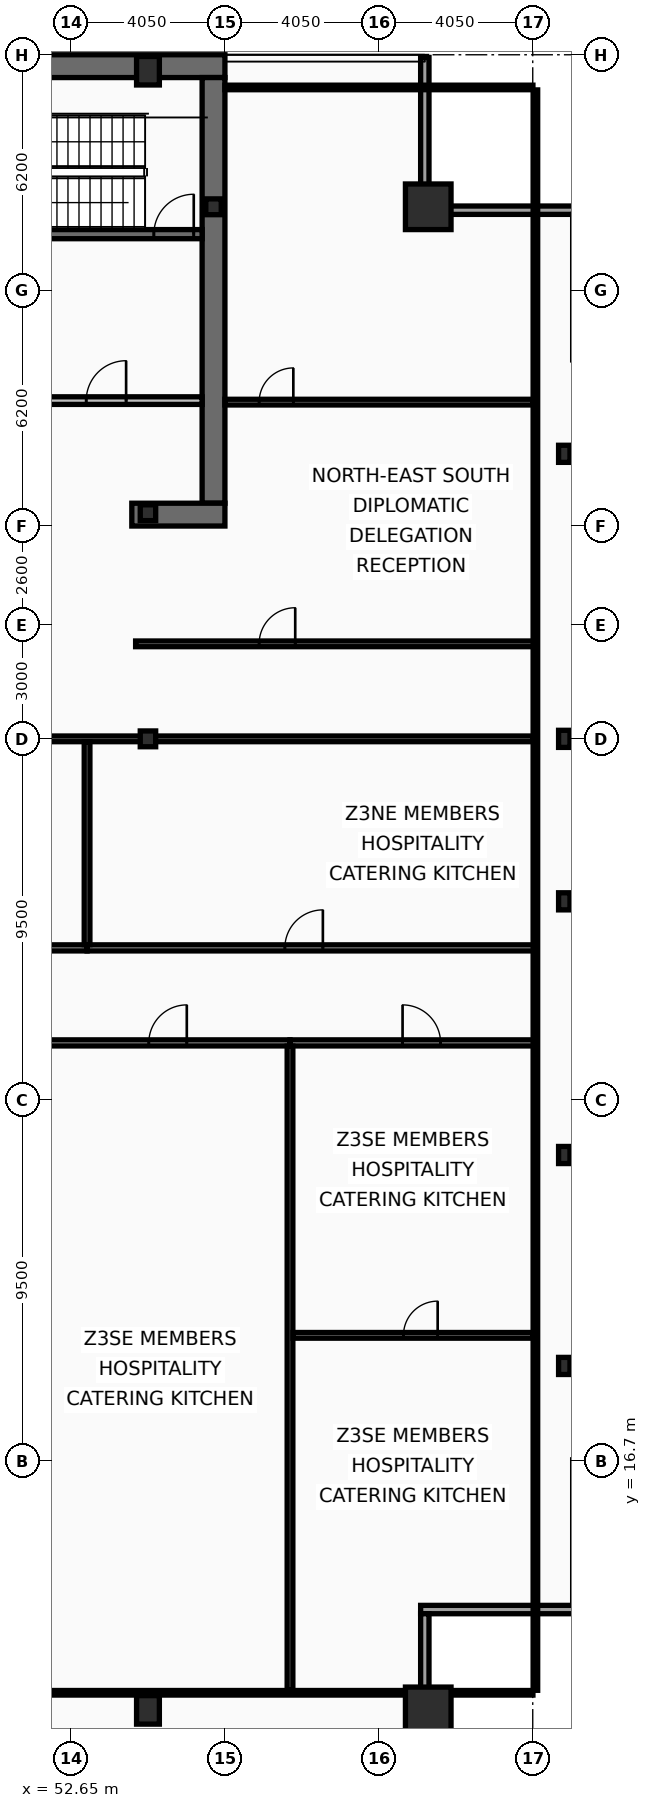
"""IFC4 building model, lengths in metres.
Left out: names, types, materials, properties, quantities, classifications, styles, units other than length and angle.
Written with IfcOpenShell. Run it as: python <this file> out.ifc"""

import sys

from ifc_helpers import new_model, si_unit, direction, frame, frame_2d, origin, origin_2d, place, context, subcontext, project, spatial, rectangle, hollow_rectangle, i_section, extrude, element, fill, save


model = new_model("IFC4")
c1 = context("Model", 3, precision=1e-05, world=origin(), true_north=direction((0.0, 1.0)))
c2 = subcontext(c1, "Body", "Model", "MODEL_VIEW")
j1 = project(units=[si_unit("LENGTHUNIT", "METRE"), si_unit("PLANEANGLEUNIT", "RADIAN")], contexts=[c1])
p1 = place(None, origin())
s1 = spatial("IfcSite", under=j1, at=p1, CompositionType="ELEMENT")
p2 = place(p1, origin())
s2 = spatial("IfcBuilding", under=s1, at=p2, CompositionType="ELEMENT")
p3 = place(p2, frame((0.0, 0.0, 210.2)))
s3 = spatial("IfcBuildingStorey", under=s2, at=p3, CompositionType="ELEMENT", Elevation=210.2)
p4 = place(p3, frame((16.2, 53.4, 0.0), z_axis=(0.0, 0.0, 1.0), x_axis=(1.0, 0.0, 0.0)))
e1 = element("IfcWall", 1, at=p4, inside=s3, PredefinedType="SHEAR", context=c2, shape_type="SweptSolid", body=[
    extrude(rectangle(XDim=40.5, YDim=0.6, at=frame_2d((20.25, 0.0))), origin(), (0.0, 0.0, 1.0), 3.44),
])
p5 = place(p3, frame((56.4, 53.1, 0.0), z_axis=(0.0, 0.0, 1.0), x_axis=(0.0, -1.0, 0.0)))
e2 = element("IfcWall", 2, at=p5, inside=s3, PredefinedType="SHEAR", context=c2, shape_type="SweptSolid", body=[
    extrude(rectangle(XDim=11.2, YDim=0.6, at=frame_2d((5.6, 0.0))), origin(), (0.0, 0.0, 1.0), 3.44),
])
p6 = place(p3, frame((56.7, 41.6, 0.0), z_axis=(0.0, 0.0, 1.0), x_axis=(-1.0, 0.0, 0.0)))
e3 = element("IfcWall", 3, at=p6, inside=s3, PredefinedType="SHEAR", context=c2, shape_type="SweptSolid", body=[
    extrude(rectangle(XDim=2.45, YDim=0.6, at=frame_2d((1.225, 0.0))), origin(), (0.0, 0.0, 1.0), 3.44),
])
p7 = place(p3, frame((48.63, 48.98, 0.0), z_axis=(0.0, 0.0, 1.0), x_axis=(1.0, 0.0, 0.0)))
e4 = element("IfcWall", 4, at=p7, inside=s3, PredefinedType="SHEAR", context=c2, shape_type="SweptSolid", body=[
    extrude(rectangle(XDim=7.47, YDim=0.24, at=frame_2d((3.735, 0.0))), origin(), (0.0, 0.0, 1.0), 3.44),
])
p8 = place(p7, frame((6.2, 0.0, 0.0)))
e5 = element("IfcOpeningElement", 5, at=p8, cuts=e4, PredefinedType="OPENING", context=c2, shape_type="SweptSolid", body=[
    extrude(rectangle(XDim=1.05, YDim=2.15, at=frame_2d((0.525, 1.075))), frame((0.0, 0.13, 0.0), z_axis=(0.0, -1.0, 0.0), x_axis=(1.0, 0.0, 0.0)), (0.0, 0.0, 1.0), 0.26),
])
for number, where, z_axis, x_axis in (
    (6, (62.05, 10.15, 0.0), (0.0, 0.0, 1.0), (1.0, 0.0, 0.0)),
    (7, (62.05, 49.7, 0.0), (0.0, 0.0, 1.0), (1.0, 0.0, 0.0)),
):
    element("IfcColumn", number, at=place(p3, frame(where, z_axis=z_axis, x_axis=x_axis)), inside=s3, PredefinedType="COLUMN", context=c2, shape_type="SweptSolid", body=[
        extrude(hollow_rectangle(XDim=1.2, YDim=1.2, WallThickness=0.06, at=origin_2d()), origin(), (0.0, 0.0, 1.0), 3.6),
    ])
for number, where, z_axis, x_axis in (
    (8, (54.675, 10.15, 0.0), (0.0, 0.0, 1.0), (1.0, 0.0, 0.0)),
    (9, (54.675, 53.28, 0.0), (0.0, 0.0, 1.0), (1.0, 0.0, 0.0)),
):
    element("IfcColumn", number, at=place(p3, frame(where, z_axis=z_axis, x_axis=x_axis)), inside=s3, PredefinedType="COLUMN", context=c2, shape_type="SweptSolid", body=[
        extrude(hollow_rectangle(XDim=0.6, YDim=0.75, WallThickness=0.045, at=origin_2d()), origin(), (0.0, 0.0, 1.0), 3.6),
    ])
for number, where, z_axis, x_axis in (
    (10, (65.63, 19.2, 0.0), (0.0, 0.0, 1.0), (1.0, 0.0, 0.0)),
    (11, (65.63, 24.75, 0.0), (0.0, 0.0, 1.0), (1.0, 0.0, 0.0)),
    (12, (65.63, 31.425, 0.0), (0.0, 0.0, 1.0), (1.0, 0.0, 0.0)),
    (13, (65.63, 35.7, 0.0), (0.0, 0.0, 1.0), (1.0, 0.0, 0.0)),
    (14, (65.63, 43.2, 0.0), (0.0, 0.0, 1.0), (1.0, 0.0, 0.0)),
):
    element("IfcColumn", number, at=place(p3, frame(where, z_axis=z_axis, x_axis=x_axis)), inside=s3, PredefinedType="COLUMN", context=c2, shape_type="SweptSolid", body=[
        extrude(i_section(OverallWidth=0.3, OverallDepth=0.45, WebThickness=0.014, FlangeThickness=0.026, at=origin_2d()), origin(), (0.0, 0.0, 1.0), 3.6),
    ])
for number, where, z_axis, x_axis in (
    (15, (56.4, 49.7, 0.0), (0.0, 0.0, 1.0), (1.0, 0.0, 0.0)),
    (16, (54.675, 35.7, 0.0), (0.0, 0.0, 1.0), (1.0, 0.0, 0.0)),
    (17, (54.675, 41.65, 0.0), (0.0, 0.0, 1.0), (1.0, 0.0, 0.0)),
):
    element("IfcColumn", number, at=place(p3, frame(where, z_axis=z_axis, x_axis=x_axis)), inside=s3, PredefinedType="COLUMN", context=c2, shape_type="SweptSolid", body=[
        extrude(i_section(OverallWidth=0.406, OverallDepth=0.416, WebThickness=0.03, FlangeThickness=0.048, at=origin_2d()), origin(), (0.0, 0.0, 1.0), 3.6),
    ])
p9 = place(p3, frame((61.96, 53.63, 0.0), z_axis=(0.0, 0.0, 1.0), x_axis=(0.0, -1.0, 0.0)))
e18 = element("IfcWall", 18, at=p9, inside=s3, PredefinedType="SOLIDWALL", context=c2, shape_type="SweptSolid", body=[
    extrude(rectangle(XDim=3.91, YDim=0.22, at=frame_2d((1.955, 0.0))), origin(), (0.0, 0.0, 1.0), 2.83),
])
for number, where, z_axis, x_axis in (
    (19, (61.85, 49.61, 0.0), (0.0, 0.0, 1.0), (1.0, 0.0, 0.0)),
    (20, (66.07, 12.79, 0.0), (0.0, 0.0, 1.0), (-1.0, 0.0, 0.0)),
):
    element("IfcWall", number, at=place(p3, frame(where, z_axis=z_axis, x_axis=x_axis)), inside=s3, PredefinedType="SOLIDWALL", context=c2, shape_type="SweptSolid", body=[
        extrude(rectangle(XDim=4.22, YDim=0.22, at=frame_2d((2.11, 0.0))), origin(), (0.0, 0.0, 1.0), 2.83),
    ])
p10 = place(p3, frame((61.96, 12.68, 0.0), z_axis=(0.0, 0.0, 1.0), x_axis=(0.0, -1.0, 0.0)))
e21 = element("IfcWall", 21, at=p10, inside=s3, PredefinedType="SOLIDWALL", context=c2, shape_type="SweptSolid", body=[
    extrude(rectangle(XDim=3.91, YDim=0.22, at=frame_2d((1.955, 0.0))), origin(), (0.0, 0.0, 1.0), 2.83),
])
p11 = place(p3, frame((51.9, 44.6, 0.0), z_axis=(0.0, 0.0, 1.0), x_axis=(1.0, 0.0, 0.0)))
e22 = element("IfcWall", 22, at=p11, inside=s3, PredefinedType="PARTITIONING", context=c2, shape_type="SweptSolid", body=[
    extrude(rectangle(XDim=4.2, YDim=0.2, at=frame_2d((2.1, 0.0))), origin(), (0.0, 0.0, 1.0), 3.44),
])
p12 = place(p11, frame((1.15, 0.0, 0.0)))
e23 = element("IfcOpeningElement", 23, at=p12, cuts=e22, PredefinedType="OPENING", context=c2, shape_type="SweptSolid", body=[
    extrude(rectangle(XDim=1.05, YDim=2.15, at=frame_2d((0.525, 1.075))), frame((0.0, 0.11, 0.0), z_axis=(0.0, -1.0, 0.0), x_axis=(1.0, 0.0, 0.0)), (0.0, 0.0, 1.0), 0.22),
])
p13 = place(p3, frame((54.35, 38.2, 0.0), z_axis=(0.0, 0.0, 1.0), x_axis=(1.0, 0.0, 0.0)))
e24 = element("IfcWall", 24, at=p13, inside=s3, PredefinedType="PARTITIONING", context=c2, shape_type="SweptSolid", body=[
    extrude(rectangle(XDim=10.52, YDim=0.15, at=frame_2d((5.26, 0.0))), origin(), (0.0, 0.0, 1.0), 2.73),
])
p14 = place(p13, frame((3.25, 0.0, 0.0)))
e25 = element("IfcOpeningElement", 25, at=p14, cuts=e24, PredefinedType="OPENING", context=c2, shape_type="SweptSolid", body=[
    extrude(rectangle(XDim=0.95, YDim=2.05, at=frame_2d((0.475, 1.025))), frame((0.0, 0.085, 0.0), z_axis=(0.0, -1.0, 0.0), x_axis=(1.0, 0.0, 0.0)), (0.0, 0.0, 1.0), 0.17),
])
p15 = place(p3, frame((56.7, 44.56, 0.0), z_axis=(0.0, 0.0, 1.0), x_axis=(1.0, 0.0, 0.0)))
e26 = element("IfcWall", 26, at=p15, inside=s3, PredefinedType="PARTITIONING", context=c2, shape_type="SweptSolid", body=[
    extrude(rectangle(XDim=8.105, YDim=0.15, at=frame_2d((4.052, 0.0))), origin(), (0.0, 0.0, 1.0), 2.83),
])
p16 = place(p15, frame((0.9, 0.0, 0.0)))
e27 = element("IfcOpeningElement", 27, at=p16, cuts=e26, PredefinedType="OPENING", context=c2, shape_type="SweptSolid", body=[
    extrude(rectangle(XDim=0.9, YDim=2.05, at=frame_2d((0.45, 1.025))), frame((0.0, 0.085, 0.0), z_axis=(0.0, -1.0, 0.0), x_axis=(1.0, 0.0, 0.0)), (0.0, 0.0, 1.0), 0.17),
])
p17 = place(p3, frame((39.88, 35.7, 0.0), z_axis=(0.0, 0.0, 1.0), x_axis=(1.0, 0.0, 0.0)))
e28 = element("IfcWall", 28, at=p17, inside=s3, PredefinedType="PARTITIONING", context=c2, shape_type="SweptSolid", body=[
    extrude(rectangle(XDim=24.925, YDim=0.15, at=frame_2d((12.462, 0.0))), origin(), (0.0, 0.0, 1.0), 2.73),
])
p18 = place(p3, frame((51.575, 27.7, 0.0), z_axis=(0.0, 0.0, 1.0), x_axis=(1.0, 0.0, 0.0)))
e29 = element("IfcWall", 29, at=p18, inside=s3, PredefinedType="PARTITIONING", context=c2, shape_type="SweptSolid", body=[
    extrude(rectangle(XDim=6.837, YDim=0.16, at=frame_2d((3.419, 0.0))), origin(), (0.0, 0.0, 1.0), 2.73),
])
p19 = place(p18, frame((3.122, 0.0, 0.0)))
e30 = element("IfcOpeningElement", 30, at=p19, cuts=e29, PredefinedType="OPENING", context=c2, shape_type="SweptSolid", body=[
    extrude(rectangle(XDim=1.0, YDim=2.05, at=frame_2d((0.5, 1.025))), frame((0.0, 0.09, 0.0), z_axis=(0.0, -1.0, 0.0), x_axis=(1.0, 0.0, 0.0)), (0.0, 0.0, 1.0), 0.18),
])
p20 = place(p3, frame((58.413, 27.7, 0.0), z_axis=(0.0, 0.0, 1.0), x_axis=(1.0, 0.0, 0.0)))
e31 = element("IfcWall", 31, at=p20, inside=s3, PredefinedType="PARTITIONING", context=c2, shape_type="SweptSolid", body=[
    extrude(rectangle(XDim=6.458, YDim=0.16, at=frame_2d((3.229, 0.0))), origin(), (0.0, 0.0, 1.0), 3.44),
])
p21 = place(p20, frame((2.962, 0.0, 0.0)))
e32 = element("IfcOpeningElement", 32, at=p21, cuts=e31, PredefinedType="OPENING", context=c2, shape_type="SweptSolid", body=[
    extrude(rectangle(XDim=1.0, YDim=2.05, at=frame_2d((0.5, 1.025))), frame((0.0, 0.09, 0.0), z_axis=(0.0, -1.0, 0.0), x_axis=(1.0, 0.0, 0.0)), (0.0, 0.0, 1.0), 0.18),
])
p22 = place(p3, frame((58.413, 10.665, 0.0), z_axis=(0.0, 0.0, 1.0), x_axis=(0.0, 1.0, 0.0)))
e33 = element("IfcWall", 33, at=p22, inside=s3, PredefinedType="PARTITIONING", context=c2, shape_type="SweptSolid", body=[
    extrude(rectangle(XDim=16.95, YDim=0.15, at=frame_2d((8.475, 0.0))), origin(), (0.0, 0.0, 1.0), 2.73),
])
p23 = place(p3, frame((58.493, 20.005, 0.0), z_axis=(0.0, 0.0, 1.0), x_axis=(1.0, 0.0, 0.0)))
e34 = element("IfcWall", 34, at=p23, inside=s3, PredefinedType="PARTITIONING", context=c2, shape_type="SweptSolid", body=[
    extrude(rectangle(XDim=6.312, YDim=0.15, at=frame_2d((3.156, 0.0))), origin(), (0.0, 0.0, 1.0), 3.44),
])
p24 = place(p23, frame((2.906, 0.0, 0.0)))
e35 = element("IfcOpeningElement", 35, at=p24, cuts=e34, PredefinedType="OPENING", context=c2, shape_type="SweptSolid", body=[
    extrude(rectangle(XDim=0.9, YDim=2.05, at=frame_2d((0.45, 1.025))), frame((0.0, 0.085, 0.0), z_axis=(0.0, -1.0, 0.0), x_axis=(1.0, 0.0, 0.0)), (0.0, 0.0, 1.0), 0.17),
])
p25 = place(p3, frame((39.8, 30.2, 0.0), z_axis=(0.0, 0.0, 1.0), x_axis=(1.0, 0.0, 0.0)))
e36 = element("IfcWall", 36, at=p25, inside=s3, PredefinedType="PARTITIONING", context=c2, shape_type="SweptSolid", body=[
    extrude(rectangle(XDim=13.272, YDim=0.16, at=frame_2d((6.636, 0.0))), origin(), (0.0, 0.0, 1.0), 2.73),
])
p26 = place(p25, frame((5.824, 0.0, 0.0)))
e37 = element("IfcOpeningElement", 37, at=p26, cuts=e36, PredefinedType="OPENING", context=c2, shape_type="SweptSolid", body=[
    extrude(rectangle(XDim=1.0, YDim=2.05, at=frame_2d((0.5, 1.025))), frame((0.0, 0.09, 0.0), z_axis=(0.0, -1.0, 0.0), x_axis=(1.0, 0.0, 0.0)), (0.0, 0.0, 1.0), 0.18),
])
p27 = place(p3, frame((53.073, 30.2, 0.0), z_axis=(0.0, 0.0, 1.0), x_axis=(1.0, 0.0, 0.0)))
e38 = element("IfcWall", 38, at=p27, inside=s3, PredefinedType="PARTITIONING", context=c2, shape_type="SweptSolid", body=[
    extrude(rectangle(XDim=11.798, YDim=0.16, at=frame_2d((5.899, 0.0))), origin(), (0.0, 0.0, 1.0), 2.73),
])
p28 = place(p27, frame((5.205, 0.0, 0.0)))
e39 = element("IfcOpeningElement", 39, at=p28, cuts=e38, PredefinedType="OPENING", context=c2, shape_type="SweptSolid", body=[
    extrude(rectangle(XDim=1.0, YDim=2.05, at=frame_2d((0.5, 1.025))), frame((0.0, 0.09, 0.0), z_axis=(0.0, -1.0, 0.0), x_axis=(1.0, 0.0, 0.0)), (0.0, 0.0, 1.0), 0.18),
])
p29 = place(p3, frame((53.073, 30.285, 0.0), z_axis=(0.0, 0.0, 1.0), x_axis=(0.0, 1.0, 0.0)))
e40 = element("IfcWall", 40, at=p29, inside=s3, PredefinedType="PARTITIONING", context=c2, shape_type="SweptSolid", body=[
    extrude(rectangle(XDim=5.335, YDim=0.15, at=frame_2d((2.667, 0.0))), origin(), (0.0, 0.0, 1.0), 2.98),
])
p30 = place(p3, frame((64.87, 10.665, 0.0), z_axis=(0.0, 0.0, 1.0), x_axis=(0.0, 1.0, 0.0)))
e41 = element("IfcWall", 41, at=p30, inside=s3, PredefinedType="PARTITIONING", context=c2, shape_type="SweptSolid", body=[
    extrude(rectangle(XDim=42.11, YDim=0.12, at=frame_2d((21.055, 0.0))), origin(), (0.0, 0.0, 1.0), 2.73),
])
p31 = place(p3, frame((56.7, 52.84, 0.0), z_axis=(0.0, 0.0, 1.0), x_axis=(1.0, 0.0, 0.0)))
e42 = element("IfcWall", 42, at=p31, inside=s3, PredefinedType="PARTITIONING", context=c2, shape_type="SweptSolid", body=[
    extrude(rectangle(XDim=8.105, YDim=0.12, at=frame_2d((4.052, 0.0))), origin(), (0.0, 0.0, 1.0), 3.44),
])
p32 = place(p3, frame((8.095, 10.6, 0.0), z_axis=(0.0, 0.0, 1.0), x_axis=(1.0, 0.0, 0.0)))
e43 = element("IfcWall", 43, at=p32, inside=s3, PredefinedType="PARTITIONING", context=c2, shape_type="SweptSolid", body=[
    extrude(rectangle(XDim=56.71, YDim=0.12, at=frame_2d((28.355, 0.0))), origin(), (0.0, 0.0, 1.0), 2.73),
])
p33 = place(p8, origin())
e44 = element("IfcDoor", 44, at=p33, inside=s3, OperationType="SINGLE_SWING_RIGHT", PredefinedType="DOOR", context=c2, shape_type="SweptSolid", body=[
    extrude(rectangle(XDim=1.05, YDim=2.15, at=frame_2d((0.525, 1.075))), frame((0.0, 0.025, 0.0), z_axis=(0.0, -1.0, 0.0), x_axis=(1.0, 0.0, 0.0)), (0.0, 0.0, 1.0), 0.05),
])
fill(e5, e44)
p34 = place(p12, origin())
e45 = element("IfcDoor", 45, at=p34, inside=s3, OperationType="SINGLE_SWING_RIGHT", PredefinedType="DOOR", context=c2, shape_type="SweptSolid", body=[
    extrude(rectangle(XDim=1.05, YDim=2.15, at=frame_2d((0.525, 1.075))), frame((0.0, 0.025, 0.0), z_axis=(0.0, -1.0, 0.0), x_axis=(1.0, 0.0, 0.0)), (0.0, 0.0, 1.0), 0.05),
])
fill(e23, e45)
p35 = place(p14, origin())
e46 = element("IfcDoor", 46, at=p35, inside=s3, OperationType="SINGLE_SWING_RIGHT", PredefinedType="DOOR", context=c2, shape_type="SweptSolid", body=[
    extrude(rectangle(XDim=0.95, YDim=2.05, at=frame_2d((0.475, 1.025))), frame((0.0, 0.025, 0.0), z_axis=(0.0, -1.0, 0.0), x_axis=(1.0, 0.0, 0.0)), (0.0, 0.0, 1.0), 0.05),
])
fill(e25, e46)
p36 = place(p16, origin())
e47 = element("IfcDoor", 47, at=p36, inside=s3, OperationType="SINGLE_SWING_RIGHT", PredefinedType="DOOR", context=c2, shape_type="SweptSolid", body=[
    extrude(rectangle(XDim=0.9, YDim=2.05, at=frame_2d((0.45, 1.025))), frame((0.0, 0.025, 0.0), z_axis=(0.0, -1.0, 0.0), x_axis=(1.0, 0.0, 0.0)), (0.0, 0.0, 1.0), 0.05),
])
fill(e27, e47)
p37 = place(p19, origin())
e48 = element("IfcDoor", 48, at=p37, inside=s3, OperationType="SINGLE_SWING_RIGHT", PredefinedType="DOOR", context=c2, shape_type="SweptSolid", body=[
    extrude(rectangle(XDim=1.0, YDim=2.05, at=frame_2d((0.5, 1.025))), frame((0.0, 0.025, 0.0), z_axis=(0.0, -1.0, 0.0), x_axis=(1.0, 0.0, 0.0)), (0.0, 0.0, 1.0), 0.05),
])
fill(e30, e48)
p38 = place(p21, origin())
e49 = element("IfcDoor", 49, at=p38, inside=s3, OperationType="SINGLE_SWING_LEFT", PredefinedType="DOOR", context=c2, shape_type="SweptSolid", body=[
    extrude(rectangle(XDim=1.0, YDim=2.05, at=frame_2d((0.5, 1.025))), frame((0.0, 0.025, 0.0), z_axis=(0.0, -1.0, 0.0), x_axis=(1.0, 0.0, 0.0)), (0.0, 0.0, 1.0), 0.05),
])
fill(e32, e49)
p39 = place(p24, origin())
e50 = element("IfcDoor", 50, at=p39, inside=s3, OperationType="SINGLE_SWING_RIGHT", PredefinedType="DOOR", context=c2, shape_type="SweptSolid", body=[
    extrude(rectangle(XDim=0.9, YDim=2.05, at=frame_2d((0.45, 1.025))), frame((0.0, 0.025, 0.0), z_axis=(0.0, -1.0, 0.0), x_axis=(1.0, 0.0, 0.0)), (0.0, 0.0, 1.0), 0.05),
])
fill(e35, e50)
p40 = place(p28, origin())
e51 = element("IfcDoor", 51, at=p40, inside=s3, OperationType="SINGLE_SWING_RIGHT", PredefinedType="DOOR", context=c2, shape_type="SweptSolid", body=[
    extrude(rectangle(XDim=1.0, YDim=2.05, at=frame_2d((0.5, 1.025))), frame((0.0, 0.025, 0.0), z_axis=(0.0, -1.0, 0.0), x_axis=(1.0, 0.0, 0.0)), (0.0, 0.0, 1.0), 0.05),
])
fill(e39, e51)
save(model, sys.argv[1])
